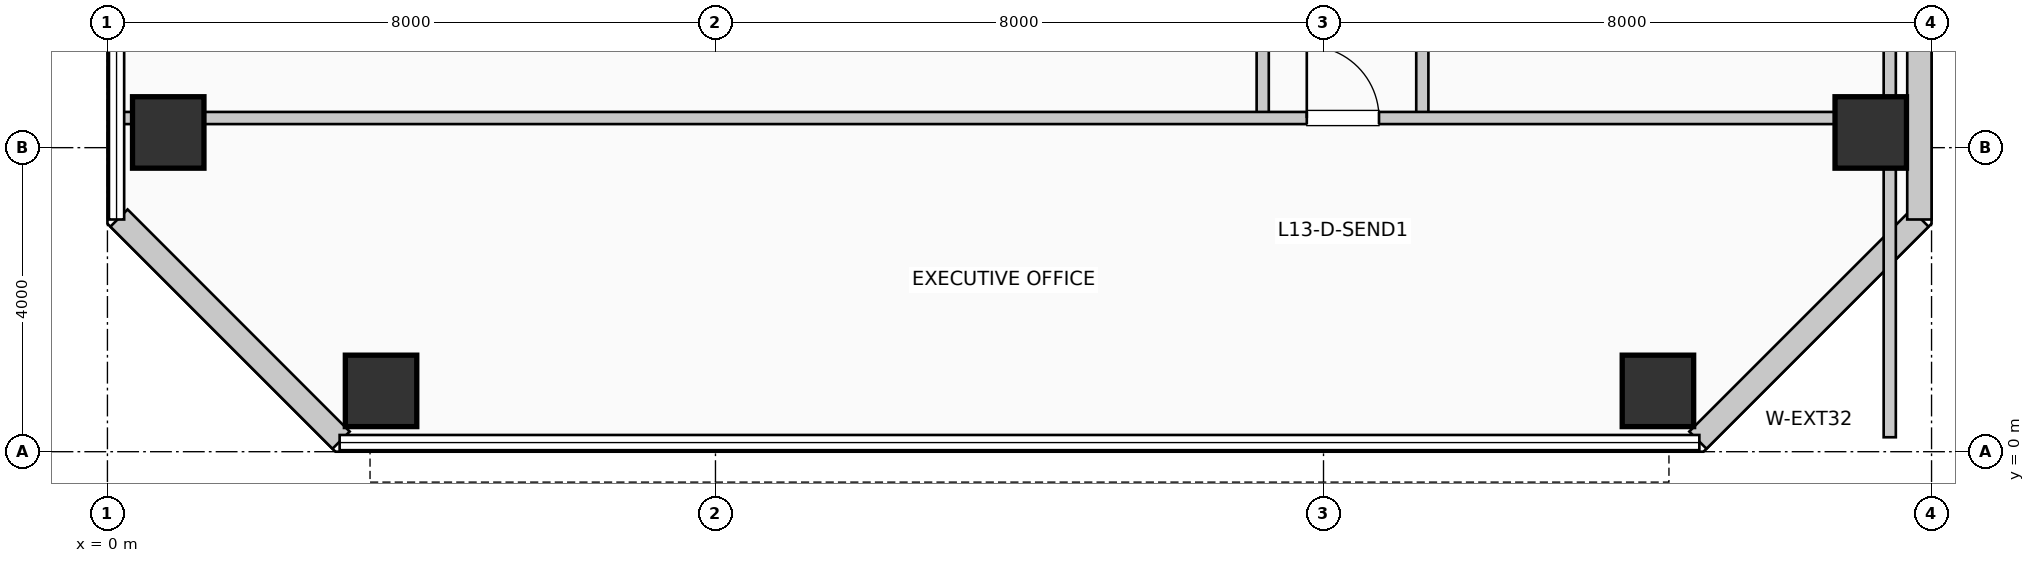
"""IFC4 building model, lengths in metres.
Left out: names, types, materials, properties, quantities, classifications, styles, units other than length and angle.
Written with IfcOpenShell. Run it as: python <this file> out.ifc"""

import sys

from ifc_helpers import new_model, si_unit, direction, frame, frame_2d, origin, origin_2d, place, context, subcontext, project, spatial, rectangle, extrude, element, fill, save


model = new_model("IFC4")
c1 = context("Model", 3, precision=1e-05, world=origin(), true_north=direction((0.0, 1.0)))
c2 = subcontext(c1, "Body", "Model", "MODEL_VIEW")
j1 = project(units=[si_unit("LENGTHUNIT", "METRE"), si_unit("PLANEANGLEUNIT", "RADIAN")], contexts=[c1])
p1 = place(None, origin())
s1 = spatial("IfcSite", under=j1, at=p1, CompositionType="ELEMENT")
p2 = place(p1, origin())
s2 = spatial("IfcBuilding", under=s1, at=p2, CompositionType="ELEMENT")
p3 = place(p2, frame((0.0, 0.0, 58.08)))
s3 = spatial("IfcBuildingStorey", under=s2, at=p3, CompositionType="ELEMENT", Elevation=58.08)
for number, where, z_axis, x_axis in (
    (1, (0.8, 4.2, 0.0), (0.0, 0.0, 1.0), (1.0, 0.0, 0.0)),
    (2, (3.6, 0.8, 0.0), (0.0, 0.0, 1.0), (1.0, 0.0, 0.0)),
    (3, (20.4, 0.8, 0.0), (0.0, 0.0, 1.0), (1.0, 0.0, 0.0)),
    (4, (23.2, 4.2, 0.0), (0.0, 0.0, 1.0), (1.0, 0.0, 0.0)),
):
    element("IfcColumn", number, at=place(p3, frame(where, z_axis=z_axis, x_axis=x_axis)), inside=s3, PredefinedType="COLUMN", context=c2, shape_type="SweptSolid", body=[
        extrude(rectangle(XDim=0.94, YDim=0.94, at=origin_2d()), origin(), (0.0, 0.0, 1.0), 3.96),
    ])
p4 = place(p3, frame((20.926, 0.152, 0.0), z_axis=(0.0, 0.0, 1.0), x_axis=(0.707106781187, 0.707106781187, 0.0)))
e5 = element("IfcWall", 5, at=p4, inside=s3, PredefinedType="SOLIDWALL", context=c2, shape_type="SweptSolid", body=[
    extrude(rectangle(XDim=4.133, YDim=0.32, at=frame_2d((2.066, 0.0))), origin(), (0.0, 0.0, 1.0), 3.71),
])
p5 = place(p3, frame((23.84, 3.055, 0.0), z_axis=(0.0, 0.0, 1.0), x_axis=(0.0, 1.0, 0.0)))
e6 = element("IfcWall", 6, at=p5, inside=s3, PredefinedType="SOLIDWALL", context=c2, shape_type="SweptSolid", body=[
    extrude(rectangle(XDim=12.89, YDim=0.32, at=frame_2d((6.445, 0.0))), origin(), (0.0, 0.0, 1.0), 3.71),
])
p6 = place(p3, frame((0.152, 3.074, 0.0), z_axis=(0.0, 0.0, 1.0), x_axis=(0.707106781187, -0.707106781187, 0.0)))
e7 = element("IfcWall", 7, at=p6, inside=s3, PredefinedType="SOLIDWALL", context=c2, shape_type="SweptSolid", body=[
    extrude(rectangle(XDim=4.133, YDim=0.32, at=frame_2d((2.066, 0.0))), origin(), (0.0, 0.0, 1.0), 3.71),
])
p7 = place(p3, frame((15.2, 4.39, 0.0), z_axis=(0.0, 0.0, 1.0), x_axis=(0.0, 1.0, 0.0)))
e8 = element("IfcWall", 8, at=p7, inside=s3, PredefinedType="PARTITIONING", context=c2, shape_type="SweptSolid", body=[
    extrude(rectangle(XDim=25.01, YDim=0.16, at=frame_2d((12.505, 0.0))), origin(), (0.0, 0.0, 1.0), 3.71),
])
p8 = place(p7, frame((2.851, 0.0, 0.0), z_axis=(0.0, 0.0, 1.0), x_axis=(-1.0, 0.0, 0.0)))
e9 = element("IfcOpeningElement", 9, at=p8, cuts=e8, PredefinedType="OPENING", context=c2, shape_type="SweptSolid", body=[
    extrude(rectangle(XDim=0.95, YDim=2.15, at=frame_2d((0.475, 1.075))), frame((0.0, 0.09, 0.0), z_axis=(0.0, -1.0, 0.0), x_axis=(1.0, 0.0, 0.0)), (0.0, 0.0, 1.0), 0.18),
])
p9 = place(p7, frame((7.728, 0.0, 0.0), z_axis=(0.0, 0.0, 1.0), x_axis=(-1.0, 0.0, 0.0)))
e10 = element("IfcOpeningElement", 10, at=p9, cuts=e8, PredefinedType="OPENING", context=c2, shape_type="SweptSolid", body=[
    extrude(rectangle(XDim=0.95, YDim=2.15, at=frame_2d((0.475, 1.075))), frame((0.0, 0.09, 0.0), z_axis=(0.0, -1.0, 0.0), x_axis=(1.0, 0.0, 0.0)), (0.0, 0.0, 1.0), 0.18),
])
p10 = place(p7, frame((12.73, 0.0, 0.0), z_axis=(0.0, 0.0, 1.0), x_axis=(-1.0, 0.0, 0.0)))
e11 = element("IfcOpeningElement", 11, at=p10, cuts=e8, PredefinedType="OPENING", context=c2, shape_type="SweptSolid", body=[
    extrude(rectangle(XDim=0.95, YDim=2.15, at=frame_2d((0.475, 1.075))), frame((0.0, 0.09, 0.0), z_axis=(0.0, -1.0, 0.0), x_axis=(1.0, 0.0, 0.0)), (0.0, 0.0, 1.0), 0.18),
])
p11 = place(p7, frame((17.732, 0.0, 0.0), z_axis=(0.0, 0.0, 1.0), x_axis=(-1.0, 0.0, 0.0)))
e12 = element("IfcOpeningElement", 12, at=p11, cuts=e8, PredefinedType="OPENING", context=c2, shape_type="SweptSolid", body=[
    extrude(rectangle(XDim=0.95, YDim=2.15, at=frame_2d((0.475, 1.075))), frame((0.0, 0.09, 0.0), z_axis=(0.0, -1.0, 0.0), x_axis=(1.0, 0.0, 0.0)), (0.0, 0.0, 1.0), 0.18),
])
p12 = place(p7, frame((22.859, 0.0, 0.0), z_axis=(0.0, 0.0, 1.0), x_axis=(-1.0, 0.0, 0.0)))
e13 = element("IfcOpeningElement", 13, at=p12, cuts=e8, PredefinedType="OPENING", context=c2, shape_type="SweptSolid", body=[
    extrude(rectangle(XDim=0.95, YDim=2.15, at=frame_2d((0.475, 1.075))), frame((0.0, 0.09, 0.0), z_axis=(0.0, -1.0, 0.0), x_axis=(1.0, 0.0, 0.0)), (0.0, 0.0, 1.0), 0.18),
])
p13 = place(p3, frame((17.3, 4.39, 0.0), z_axis=(0.0, 0.0, 1.0), x_axis=(0.0, 1.0, 0.0)))
e14 = element("IfcWall", 14, at=p13, inside=s3, PredefinedType="PARTITIONING", context=c2, shape_type="SweptSolid", body=[
    extrude(rectangle(XDim=25.01, YDim=0.16, at=frame_2d((12.505, 0.0))), origin(), (0.0, 0.0, 1.0), 3.71),
])
p14 = place(p13, frame((5.778, 0.0, 0.0)))
e15 = element("IfcOpeningElement", 15, at=p14, cuts=e14, PredefinedType="OPENING", context=c2, shape_type="SweptSolid", body=[
    extrude(rectangle(XDim=0.95, YDim=2.15, at=frame_2d((0.475, 1.075))), frame((0.0, 0.09, 0.0), z_axis=(0.0, -1.0, 0.0), x_axis=(1.0, 0.0, 0.0)), (0.0, 0.0, 1.0), 0.18),
])
p15 = place(p13, frame((18.282, 0.0, 0.0)))
e16 = element("IfcOpeningElement", 16, at=p15, cuts=e14, PredefinedType="OPENING", context=c2, shape_type="SweptSolid", body=[
    extrude(rectangle(XDim=0.95, YDim=2.15, at=frame_2d((0.475, 1.075))), frame((0.0, 0.09, 0.0), z_axis=(0.0, -1.0, 0.0), x_axis=(1.0, 0.0, 0.0)), (0.0, 0.0, 1.0), 0.18),
])
p16 = place(p3, frame((0.19, 4.39, 0.0), z_axis=(0.0, 0.0, 1.0), x_axis=(1.0, 0.0, 0.0)))
e17 = element("IfcWall", 17, at=p16, inside=s3, PredefinedType="PARTITIONING", context=c2, shape_type="SweptSolid", body=[
    extrude(rectangle(XDim=23.26, YDim=0.16, at=frame_2d((11.63, 0.0))), origin(), (0.0, 0.0, 1.0), 2.995),
])
p17 = place(p16, frame((15.59, 0.0, 0.0)))
e18 = element("IfcOpeningElement", 18, at=p17, cuts=e17, PredefinedType="OPENING", context=c2, shape_type="SweptSolid", body=[
    extrude(rectangle(XDim=0.95, YDim=2.15, at=frame_2d((0.475, 1.075))), frame((0.0, 0.09, 0.0), z_axis=(0.0, -1.0, 0.0), x_axis=(1.0, 0.0, 0.0)), (0.0, 0.0, 1.0), 0.18),
])
p18 = place(p3, frame((23.45, 0.19, 0.0), z_axis=(0.0, 0.0, 1.0), x_axis=(0.0, 1.0, 0.0)))
e19 = element("IfcWall", 19, at=p18, inside=s3, PredefinedType="PARTITIONING", context=c2, shape_type="SweptSolid", body=[
    extrude(rectangle(XDim=29.21, YDim=0.16, at=frame_2d((14.605, 0.0))), origin(), (0.0, 0.0, 1.0), 2.995),
])
p19 = place(p17, origin())
e20 = element("IfcDoor", 20, at=p19, inside=s3, OperationType="SINGLE_SWING_LEFT", PredefinedType="DOOR", context=c2, shape_type="SweptSolid", body=[
    extrude(rectangle(XDim=0.95, YDim=2.15, at=frame_2d((0.475, 1.075))), frame((0.0, 0.025, 0.0), z_axis=(0.0, -1.0, 0.0), x_axis=(1.0, 0.0, 0.0)), (0.0, 0.0, 1.0), 0.05),
])
fill(e18, e20)
save(model, sys.argv[1])
